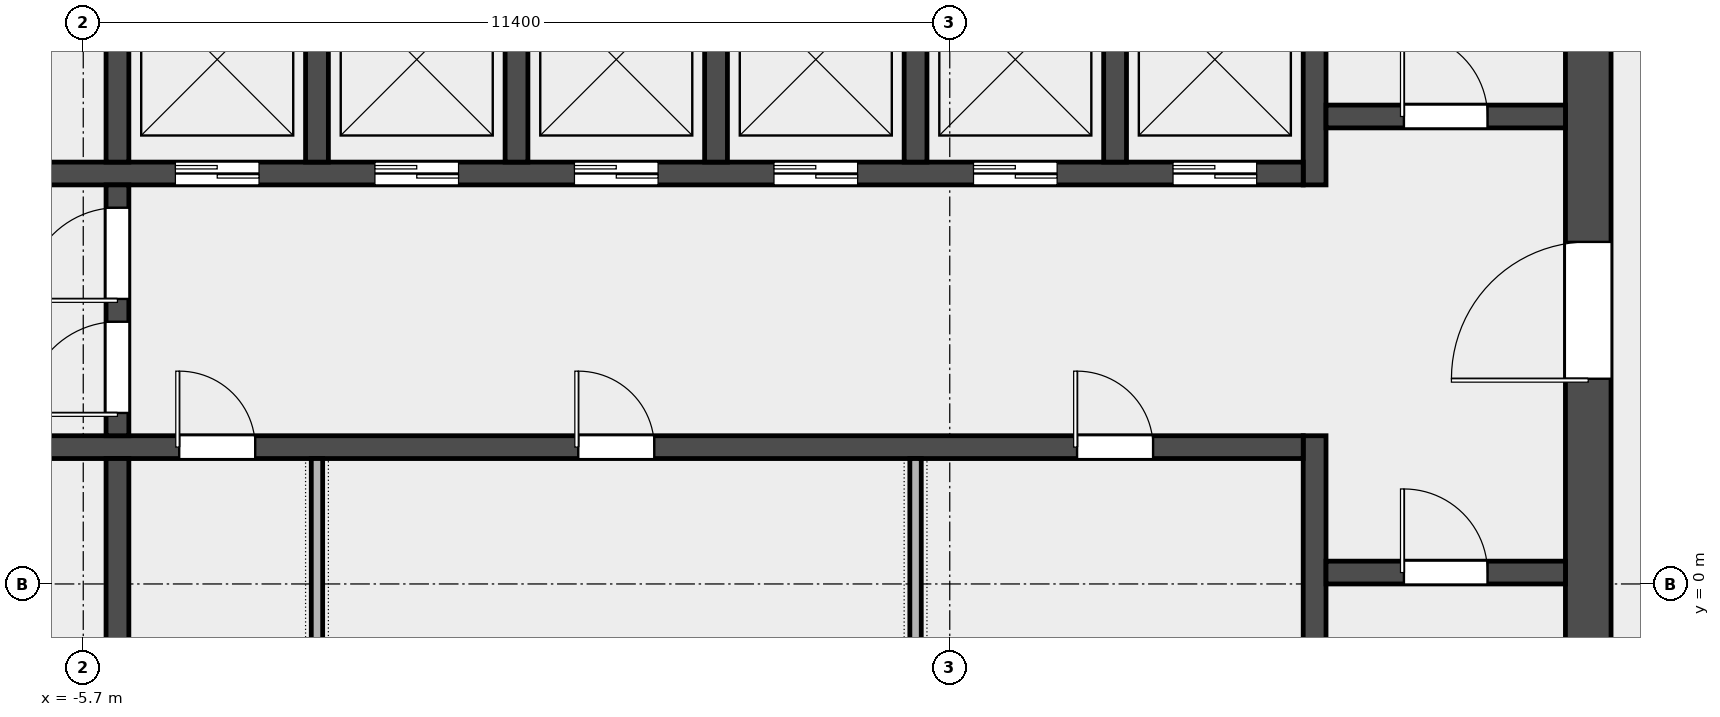
"""IFC4 building model, lengths in metres.
Left out: names, types, materials, properties, quantities, classifications, styles, units other than length and angle.
Written with IfcOpenShell. Run it as: python <this file> out.ifc"""

import sys

from ifc_helpers import new_model, si_unit, direction, frame, frame_2d, origin, place, context, subcontext, project, spatial, rectangle, extrude, element, fill, save


model = new_model("IFC4")
c1 = context("Model", 3, precision=1e-05, world=origin(), true_north=direction((0.0, 1.0)))
c2 = subcontext(c1, "Body", "Model", "MODEL_VIEW")
j1 = project(units=[si_unit("LENGTHUNIT", "METRE"), si_unit("PLANEANGLEUNIT", "RADIAN")], contexts=[c1])
p1 = place(None, origin())
s1 = spatial("IfcSite", under=j1, at=p1, CompositionType="ELEMENT")
p2 = place(p1, origin())
s2 = spatial("IfcBuilding", under=s1, at=p2, CompositionType="ELEMENT")
p3 = place(p2, frame((0.0, 0.0, 353.4)))
s3 = spatial("IfcBuildingStorey", under=s2, at=p3, CompositionType="ELEMENT", Elevation=353.4)
p4 = place(p3, frame((14.1, -6.6, 0.0), z_axis=(0.0, 0.0, 1.0), x_axis=(0.0, 1.0, 0.0)))
e1 = element("IfcWall", 1, at=p4, inside=s3, PredefinedType="SHEAR", context=c2, shape_type="SweptSolid", body=[
    extrude(rectangle(XDim=19.5, YDim=0.6, at=frame_2d((9.75, 0.0))), origin(), (0.0, 0.0, 1.0), 3.7),
])
p5 = place(p4, frame((9.3, 0.0, 0.0)))
e2 = element("IfcOpeningElement", 2, at=p5, cuts=e1, PredefinedType="OPENING", context=c2, shape_type="SweptSolid", body=[
    extrude(rectangle(XDim=1.8, YDim=2.1, at=frame_2d((0.9, 1.05))), frame((0.0, 0.312, 0.0), z_axis=(0.0, -1.0, 0.0), x_axis=(1.0, 0.0, 0.0)), (0.0, 0.0, 1.0), 0.624),
])
p6 = place(p3, frame((10.5, -6.6, 0.0), z_axis=(0.0, 0.0, 1.0), x_axis=(0.0, 1.0, 0.0)))
e3 = element("IfcWall", 3, at=p6, inside=s3, PredefinedType="SHEAR", context=c2, shape_type="SweptSolid", body=[
    extrude(rectangle(XDim=8.55, YDim=0.3, at=frame_2d((4.275, 0.0))), origin(), (0.0, 0.0, 1.0), 3.7),
])
p7 = place(p3, frame((10.5, 5.25, 0.0), z_axis=(0.0, 0.0, 1.0), x_axis=(0.0, 1.0, 0.0)))
e4 = element("IfcWall", 4, at=p7, inside=s3, PredefinedType="SHEAR", context=c2, shape_type="SweptSolid", body=[
    extrude(rectangle(XDim=7.65, YDim=0.3, at=frame_2d((3.825, 0.0))), origin(), (0.0, 0.0, 1.0), 3.7),
])
p8 = place(p3, frame((10.65, 0.15, 0.0), z_axis=(0.0, 0.0, 1.0), x_axis=(1.0, 0.0, 0.0)))
e5 = element("IfcWall", 5, at=p8, inside=s3, PredefinedType="SOLIDWALL", context=c2, shape_type="SweptSolid", body=[
    extrude(rectangle(XDim=3.15, YDim=0.3, at=frame_2d((1.575, 0.0))), origin(), (0.0, 0.0, 1.0), 3.7),
])
p9 = place(p8, frame((1.025, 0.0, 0.0)))
e6 = element("IfcOpeningElement", 6, at=p9, cuts=e5, PredefinedType="OPENING", context=c2, shape_type="SweptSolid", body=[
    extrude(rectangle(XDim=1.1, YDim=2.1, at=frame_2d((0.55, 1.05))), frame((0.0, 0.162, 0.0), z_axis=(0.0, -1.0, 0.0), x_axis=(1.0, 0.0, 0.0)), (0.0, 0.0, 1.0), 0.324),
])
p10 = place(p3, frame((10.65, 6.15, 0.0), z_axis=(0.0, 0.0, 1.0), x_axis=(1.0, 0.0, 0.0)))
e7 = element("IfcWall", 7, at=p10, inside=s3, PredefinedType="SOLIDWALL", context=c2, shape_type="SweptSolid", body=[
    extrude(rectangle(XDim=3.15, YDim=0.3, at=frame_2d((1.575, 0.0))), origin(), (0.0, 0.0, 1.0), 3.7),
])
p11 = place(p10, frame((1.025, 0.0, 0.0)))
e8 = element("IfcOpeningElement", 8, at=p11, cuts=e7, PredefinedType="OPENING", context=c2, shape_type="SweptSolid", body=[
    extrude(rectangle(XDim=1.1, YDim=2.1, at=frame_2d((0.55, 1.05))), frame((0.0, 0.162, 0.0), z_axis=(0.0, -1.0, 0.0), x_axis=(1.0, 0.0, 0.0)), (0.0, 0.0, 1.0), 0.324),
])
p12 = place(p3, frame((-10.35, 1.8, 0.0), z_axis=(0.0, 0.0, 1.0), x_axis=(1.0, 0.0, 0.0)))
e9 = element("IfcWall", 9, at=p12, inside=s3, PredefinedType="SOLIDWALL", context=c2, shape_type="SweptSolid", body=[
    extrude(rectangle(XDim=20.7, YDim=0.3, at=frame_2d((10.35, 0.0))), origin(), (0.0, 0.0, 1.0), 3.7),
])
p13 = place(p12, frame((0.512, 0.0, 0.0)))
e10 = element("IfcOpeningElement", 10, at=p13, cuts=e9, PredefinedType="OPENING", context=c2, shape_type="SweptSolid", body=[
    extrude(rectangle(XDim=1.3, YDim=2.1, at=frame_2d((0.65, 1.05))), frame((0.0, 0.162, 0.0), z_axis=(0.0, -1.0, 0.0), x_axis=(1.0, 0.0, 0.0)), (0.0, 0.0, 1.0), 0.324),
])
p14 = place(p12, frame((5.913, 0.0, 0.0)))
e11 = element("IfcOpeningElement", 11, at=p14, cuts=e9, PredefinedType="OPENING", context=c2, shape_type="SweptSolid", body=[
    extrude(rectangle(XDim=1.0, YDim=2.1, at=frame_2d((0.5, 1.05))), frame((0.0, 0.162, 0.0), z_axis=(0.0, -1.0, 0.0), x_axis=(1.0, 0.0, 0.0)), (0.0, 0.0, 1.0), 0.324),
])
p15 = place(p12, frame((11.163, 0.0, 0.0)))
e12 = element("IfcOpeningElement", 12, at=p15, cuts=e9, PredefinedType="OPENING", context=c2, shape_type="SweptSolid", body=[
    extrude(rectangle(XDim=1.0, YDim=2.1, at=frame_2d((0.5, 1.05))), frame((0.0, 0.162, 0.0), z_axis=(0.0, -1.0, 0.0), x_axis=(1.0, 0.0, 0.0)), (0.0, 0.0, 1.0), 0.324),
])
p16 = place(p12, frame((17.725, 0.0, 0.0)))
e13 = element("IfcOpeningElement", 13, at=p16, cuts=e9, PredefinedType="OPENING", context=c2, shape_type="SweptSolid", body=[
    extrude(rectangle(XDim=1.0, YDim=2.1, at=frame_2d((0.5, 1.05))), frame((0.0, 0.162, 0.0), z_axis=(0.0, -1.0, 0.0), x_axis=(1.0, 0.0, 0.0)), (0.0, 0.0, 1.0), 0.324),
])
p17 = place(p3, frame((-10.35, 5.4, 0.0), z_axis=(0.0, 0.0, 1.0), x_axis=(1.0, 0.0, 0.0)))
e14 = element("IfcWall", 14, at=p17, inside=s3, PredefinedType="SOLIDWALL", context=c2, shape_type="SweptSolid", body=[
    extrude(rectangle(XDim=20.7, YDim=0.3, at=frame_2d((10.35, 0.0))), origin(), (0.0, 0.0, 1.0), 3.7),
])
p18 = place(p17, frame((0.512, 0.0, 0.0)))
e15 = element("IfcOpeningElement", 15, at=p18, cuts=e14, PredefinedType="OPENING", context=c2, shape_type="SweptSolid", body=[
    extrude(rectangle(XDim=1.3, YDim=2.1, at=frame_2d((0.65, 1.05))), frame((0.0, 0.162, 0.0), z_axis=(0.0, -1.0, 0.0), x_axis=(1.0, 0.0, 0.0)), (0.0, 0.0, 1.0), 0.324),
])
p19 = place(p17, frame((5.863, 0.0, 0.0)))
e16 = element("IfcOpeningElement", 16, at=p19, cuts=e14, PredefinedType="OPENING", context=c2, shape_type="SweptSolid", body=[
    extrude(rectangle(XDim=1.1, YDim=2.1, at=frame_2d((0.55, 1.05))), frame((0.0, 0.162, 0.0), z_axis=(0.0, -1.0, 0.0), x_axis=(1.0, 0.0, 0.0)), (0.0, 0.0, 1.0), 0.324),
])
p20 = place(p17, frame((8.488, 0.0, 0.0)))
e17 = element("IfcOpeningElement", 17, at=p20, cuts=e14, PredefinedType="OPENING", context=c2, shape_type="SweptSolid", body=[
    extrude(rectangle(XDim=1.1, YDim=2.1, at=frame_2d((0.55, 1.05))), frame((0.0, 0.162, 0.0), z_axis=(0.0, -1.0, 0.0), x_axis=(1.0, 0.0, 0.0)), (0.0, 0.0, 1.0), 0.324),
])
p21 = place(p17, frame((11.113, 0.0, 0.0)))
e18 = element("IfcOpeningElement", 18, at=p21, cuts=e14, PredefinedType="OPENING", context=c2, shape_type="SweptSolid", body=[
    extrude(rectangle(XDim=1.1, YDim=2.1, at=frame_2d((0.55, 1.05))), frame((0.0, 0.162, 0.0), z_axis=(0.0, -1.0, 0.0), x_axis=(1.0, 0.0, 0.0)), (0.0, 0.0, 1.0), 0.324),
])
p22 = place(p17, frame((13.738, 0.0, 0.0)))
e19 = element("IfcOpeningElement", 19, at=p22, cuts=e14, PredefinedType="OPENING", context=c2, shape_type="SweptSolid", body=[
    extrude(rectangle(XDim=1.1, YDim=2.1, at=frame_2d((0.55, 1.05))), frame((0.0, 0.162, 0.0), z_axis=(0.0, -1.0, 0.0), x_axis=(1.0, 0.0, 0.0)), (0.0, 0.0, 1.0), 0.324),
])
p23 = place(p17, frame((16.363, 0.0, 0.0)))
e20 = element("IfcOpeningElement", 20, at=p23, cuts=e14, PredefinedType="OPENING", context=c2, shape_type="SweptSolid", body=[
    extrude(rectangle(XDim=1.1, YDim=2.1, at=frame_2d((0.55, 1.05))), frame((0.0, 0.162, 0.0), z_axis=(0.0, -1.0, 0.0), x_axis=(1.0, 0.0, 0.0)), (0.0, 0.0, 1.0), 0.324),
])
p24 = place(p17, frame((18.988, 0.0, 0.0)))
e21 = element("IfcOpeningElement", 21, at=p24, cuts=e14, PredefinedType="OPENING", context=c2, shape_type="SweptSolid", body=[
    extrude(rectangle(XDim=1.1, YDim=2.1, at=frame_2d((0.55, 1.05))), frame((0.0, 0.162, 0.0), z_axis=(0.0, -1.0, 0.0), x_axis=(1.0, 0.0, 0.0)), (0.0, 0.0, 1.0), 0.324),
])
for number, where, z_axis, x_axis in (
    (22, (-5.25, -1.05, 0.0), (0.0, 0.0, 1.0), (0.0, 1.0, 0.0)),
    (23, (-5.25, 5.55, 0.0), (0.0, 0.0, 1.0), (0.0, 1.0, 0.0)),
    (24, (-2.625, 5.55, 0.0), (0.0, 0.0, 1.0), (0.0, 1.0, 0.0)),
    (25, (0.0, 5.55, 0.0), (0.0, 0.0, 1.0), (0.0, 1.0, 0.0)),
    (26, (2.625, 5.55, 0.0), (0.0, 0.0, 1.0), (0.0, 1.0, 0.0)),
    (27, (5.25, 5.55, 0.0), (0.0, 0.0, 1.0), (0.0, 1.0, 0.0)),
    (28, (7.875, 5.55, 0.0), (0.0, 0.0, 1.0), (0.0, 1.0, 0.0)),
):
    element("IfcWall", number, at=place(p3, frame(where, z_axis=z_axis, x_axis=x_axis)), inside=s3, PredefinedType="SOLIDWALL", context=c2, shape_type="SweptSolid", body=[
        extrude(rectangle(XDim=2.7, YDim=0.3, at=frame_2d((1.35, 0.0))), origin(), (0.0, 0.0, 1.0), 3.7),
    ])
p25 = place(p3, frame((-5.25, 1.95, 0.0), z_axis=(0.0, 0.0, 1.0), x_axis=(0.0, 1.0, 0.0)))
e29 = element("IfcWall", 29, at=p25, inside=s3, PredefinedType="SOLIDWALL", context=c2, shape_type="SweptSolid", body=[
    extrude(rectangle(XDim=3.3, YDim=0.3, at=frame_2d((1.65, 0.0))), origin(), (0.0, 0.0, 1.0), 3.7),
])
p26 = place(p25, frame((0.3, 0.0, 0.0)))
e30 = element("IfcOpeningElement", 30, at=p26, cuts=e29, PredefinedType="OPENING", context=c2, shape_type="SweptSolid", body=[
    extrude(rectangle(XDim=1.2, YDim=2.1, at=frame_2d((0.6, 1.05))), frame((0.0, 0.162, 0.0), z_axis=(0.0, -1.0, 0.0), x_axis=(1.0, 0.0, 0.0)), (0.0, 0.0, 1.0), 0.324),
])
p27 = place(p25, frame((1.8, 0.0, 0.0)))
e31 = element("IfcOpeningElement", 31, at=p27, cuts=e29, PredefinedType="OPENING", context=c2, shape_type="SweptSolid", body=[
    extrude(rectangle(XDim=1.2, YDim=2.1, at=frame_2d((0.6, 1.05))), frame((0.0, 0.162, 0.0), z_axis=(0.0, -1.0, 0.0), x_axis=(1.0, 0.0, 0.0)), (0.0, 0.0, 1.0), 0.324),
])
for number, where, z_axis, x_axis in (
    (32, (-2.625, -1.05, 0.0), (0.0, 0.0, 1.0), (0.0, 1.0, 0.0)),
    (33, (5.25, -1.05, 0.0), (0.0, 0.0, 1.0), (0.0, 1.0, 0.0)),
):
    element("IfcWall", number, at=place(p3, frame(where, z_axis=z_axis, x_axis=x_axis)), inside=s3, PredefinedType="PARTITIONING", context=c2, shape_type="SweptSolid", body=[
        extrude(rectangle(XDim=2.7, YDim=0.15, at=frame_2d((1.35, 0.0))), origin(), (0.0, 0.0, 1.0), 3.7),
    ])
p28 = place(p9, origin())
e34 = element("IfcDoor", 34, at=p28, inside=s3, OperationType="SINGLE_SWING_RIGHT", PredefinedType="DOOR", context=c2, shape_type="SweptSolid", body=[
    extrude(rectangle(XDim=1.1, YDim=2.1, at=frame_2d((0.55, 1.05))), frame((0.0, 0.025, 0.0), z_axis=(0.0, -1.0, 0.0), x_axis=(1.0, 0.0, 0.0)), (0.0, 0.0, 1.0), 0.05),
])
fill(e6, e34)
p29 = place(p11, origin())
e35 = element("IfcDoor", 35, at=p29, inside=s3, OperationType="SINGLE_SWING_RIGHT", PredefinedType="DOOR", context=c2, shape_type="SweptSolid", body=[
    extrude(rectangle(XDim=1.1, YDim=2.1, at=frame_2d((0.55, 1.05))), frame((0.0, 0.025, 0.0), z_axis=(0.0, -1.0, 0.0), x_axis=(1.0, 0.0, 0.0)), (0.0, 0.0, 1.0), 0.05),
])
fill(e8, e35)
p30 = place(p5, origin())
e36 = element("IfcDoor", 36, at=p30, inside=s3, OperationType="DOUBLE_DOOR_SINGLE_SWING", PredefinedType="DOOR", context=c2, shape_type="SweptSolid", body=[
    extrude(rectangle(XDim=1.8, YDim=2.1, at=frame_2d((0.9, 1.05))), frame((0.0, 0.025, 0.0), z_axis=(0.0, -1.0, 0.0), x_axis=(1.0, 0.0, 0.0)), (0.0, 0.0, 1.0), 0.05),
])
fill(e2, e36)
p31 = place(p26, origin())
e37 = element("IfcDoor", 37, at=p31, inside=s3, OperationType="SINGLE_SWING_LEFT", PredefinedType="DOOR", context=c2, shape_type="SweptSolid", body=[
    extrude(rectangle(XDim=1.2, YDim=2.1, at=frame_2d((0.6, 1.05))), frame((0.0, 0.025, 0.0), z_axis=(0.0, -1.0, 0.0), x_axis=(1.0, 0.0, 0.0)), (0.0, 0.0, 1.0), 0.05),
])
fill(e30, e37)
p32 = place(p27, origin())
e38 = element("IfcDoor", 38, at=p32, inside=s3, OperationType="SINGLE_SWING_RIGHT", PredefinedType="DOOR", context=c2, shape_type="SweptSolid", body=[
    extrude(rectangle(XDim=1.2, YDim=2.1, at=frame_2d((0.6, 1.05))), frame((0.0, 0.025, 0.0), z_axis=(0.0, -1.0, 0.0), x_axis=(1.0, 0.0, 0.0)), (0.0, 0.0, 1.0), 0.05),
])
fill(e31, e38)
p33 = place(p19, origin())
e39 = element("IfcDoor", 39, at=p33, inside=s3, OperationType="DOUBLE_DOOR_SLIDING", PredefinedType="DOOR", context=c2, shape_type="SweptSolid", body=[
    extrude(rectangle(XDim=1.1, YDim=2.1, at=frame_2d((0.55, 1.05))), frame((0.0, 0.025, 0.0), z_axis=(0.0, -1.0, 0.0), x_axis=(1.0, 0.0, 0.0)), (0.0, 0.0, 1.0), 0.05),
])
fill(e16, e39)
p34 = place(p20, origin())
e40 = element("IfcDoor", 40, at=p34, inside=s3, OperationType="DOUBLE_DOOR_SLIDING", PredefinedType="DOOR", context=c2, shape_type="SweptSolid", body=[
    extrude(rectangle(XDim=1.1, YDim=2.1, at=frame_2d((0.55, 1.05))), frame((0.0, 0.025, 0.0), z_axis=(0.0, -1.0, 0.0), x_axis=(1.0, 0.0, 0.0)), (0.0, 0.0, 1.0), 0.05),
])
fill(e17, e40)
p35 = place(p21, origin())
e41 = element("IfcDoor", 41, at=p35, inside=s3, OperationType="DOUBLE_DOOR_SLIDING", PredefinedType="DOOR", context=c2, shape_type="SweptSolid", body=[
    extrude(rectangle(XDim=1.1, YDim=2.1, at=frame_2d((0.55, 1.05))), frame((0.0, 0.025, 0.0), z_axis=(0.0, -1.0, 0.0), x_axis=(1.0, 0.0, 0.0)), (0.0, 0.0, 1.0), 0.05),
])
fill(e18, e41)
p36 = place(p22, origin())
e42 = element("IfcDoor", 42, at=p36, inside=s3, OperationType="DOUBLE_DOOR_SLIDING", PredefinedType="DOOR", context=c2, shape_type="SweptSolid", body=[
    extrude(rectangle(XDim=1.1, YDim=2.1, at=frame_2d((0.55, 1.05))), frame((0.0, 0.025, 0.0), z_axis=(0.0, -1.0, 0.0), x_axis=(1.0, 0.0, 0.0)), (0.0, 0.0, 1.0), 0.05),
])
fill(e19, e42)
p37 = place(p23, origin())
e43 = element("IfcDoor", 43, at=p37, inside=s3, OperationType="DOUBLE_DOOR_SLIDING", PredefinedType="DOOR", context=c2, shape_type="SweptSolid", body=[
    extrude(rectangle(XDim=1.1, YDim=2.1, at=frame_2d((0.55, 1.05))), frame((0.0, 0.025, 0.0), z_axis=(0.0, -1.0, 0.0), x_axis=(1.0, 0.0, 0.0)), (0.0, 0.0, 1.0), 0.05),
])
fill(e20, e43)
p38 = place(p24, origin())
e44 = element("IfcDoor", 44, at=p38, inside=s3, OperationType="DOUBLE_DOOR_SLIDING", PredefinedType="DOOR", context=c2, shape_type="SweptSolid", body=[
    extrude(rectangle(XDim=1.1, YDim=2.1, at=frame_2d((0.55, 1.05))), frame((0.0, 0.025, 0.0), z_axis=(0.0, -1.0, 0.0), x_axis=(1.0, 0.0, 0.0)), (0.0, 0.0, 1.0), 0.05),
])
fill(e21, e44)
p39 = place(p14, origin())
e45 = element("IfcDoor", 45, at=p39, inside=s3, OperationType="SINGLE_SWING_LEFT", PredefinedType="DOOR", context=c2, shape_type="SweptSolid", body=[
    extrude(rectangle(XDim=1.0, YDim=2.1, at=frame_2d((0.5, 1.05))), frame((0.0, 0.025, 0.0), z_axis=(0.0, -1.0, 0.0), x_axis=(1.0, 0.0, 0.0)), (0.0, 0.0, 1.0), 0.05),
])
fill(e11, e45)
p40 = place(p15, origin())
e46 = element("IfcDoor", 46, at=p40, inside=s3, OperationType="SINGLE_SWING_LEFT", PredefinedType="DOOR", context=c2, shape_type="SweptSolid", body=[
    extrude(rectangle(XDim=1.0, YDim=2.1, at=frame_2d((0.5, 1.05))), frame((0.0, 0.025, 0.0), z_axis=(0.0, -1.0, 0.0), x_axis=(1.0, 0.0, 0.0)), (0.0, 0.0, 1.0), 0.05),
])
fill(e12, e46)
p41 = place(p16, origin())
e47 = element("IfcDoor", 47, at=p41, inside=s3, OperationType="SINGLE_SWING_LEFT", PredefinedType="DOOR", context=c2, shape_type="SweptSolid", body=[
    extrude(rectangle(XDim=1.0, YDim=2.1, at=frame_2d((0.5, 1.05))), frame((0.0, 0.025, 0.0), z_axis=(0.0, -1.0, 0.0), x_axis=(1.0, 0.0, 0.0)), (0.0, 0.0, 1.0), 0.05),
])
fill(e13, e47)
save(model, sys.argv[1])
